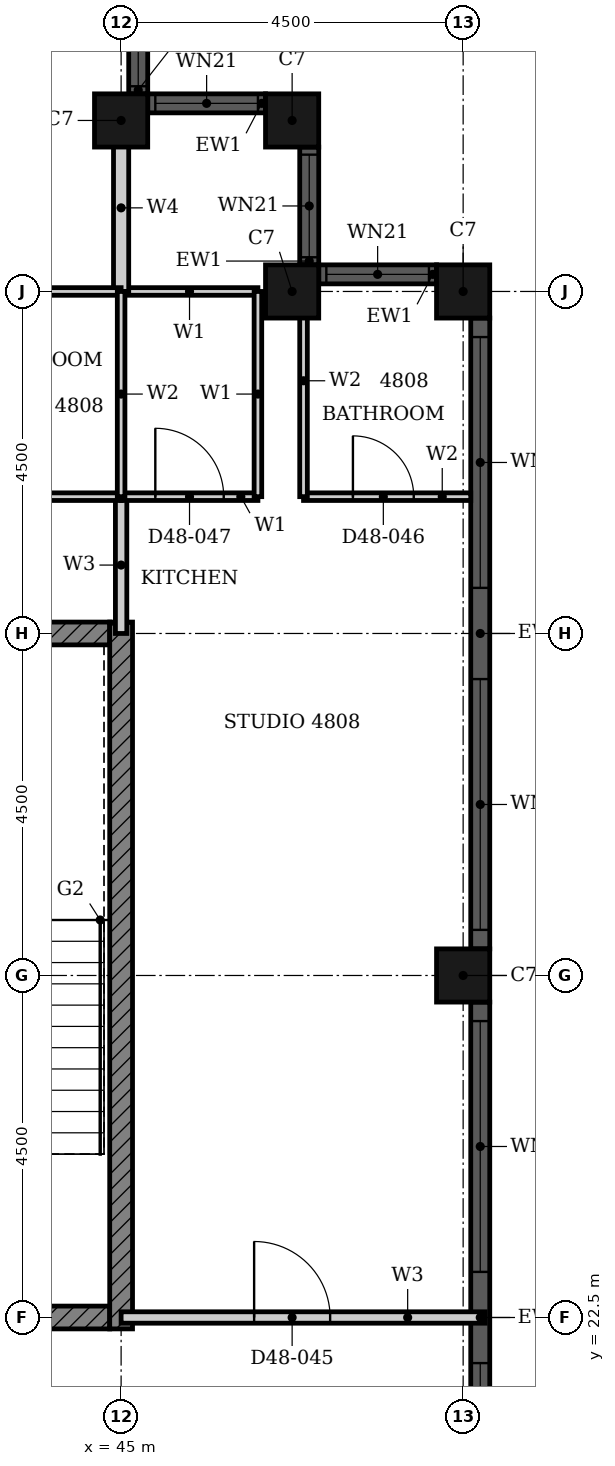
"""IFC4 building model, lengths in metres.
Left out: names, types, materials, properties, quantities, classifications, styles, units other than length and angle.
Written with IfcOpenShell. Run it as: python <this file> out.ifc"""

import sys

from ifc_helpers import new_model, si_unit, direction, frame, frame_2d, origin, origin_2d, place, context, subcontext, project, spatial, rectangle, hollow_rectangle, extrude, element, fill, save


model = new_model("IFC4")
c1 = context("Model", 3, precision=1e-05, world=origin(), true_north=direction((0.0, 1.0)))
c2 = subcontext(c1, "Body", "Model", "MODEL_VIEW")
j1 = project(units=[si_unit("LENGTHUNIT", "METRE"), si_unit("PLANEANGLEUNIT", "RADIAN")], contexts=[c1])
p1 = place(None, origin())
s1 = spatial("IfcSite", under=j1, at=p1, CompositionType="ELEMENT")
p2 = place(p1, origin())
s2 = spatial("IfcBuilding", under=s1, at=p2, CompositionType="ELEMENT")
p3 = place(p2, frame((0.0, 0.0, 192.4)))
s3 = spatial("IfcBuildingStorey", under=s2, at=p3, CompositionType="ELEMENT", Elevation=192.4)
for number, where, z_axis, x_axis in (
    (1, (49.5, 27.0, 0.0), (0.0, 0.0, 1.0), (1.0, 0.0, 0.0)),
    (2, (49.5, 36.0, 0.0), (0.0, 0.0, 1.0), (1.0, 0.0, 0.0)),
    (3, (47.25, 36.0, 0.0), (0.0, 0.0, 1.0), (1.0, 0.0, 0.0)),
    (4, (47.25, 38.25, 0.0), (0.0, 0.0, 1.0), (1.0, 0.0, 0.0)),
    (5, (45.0, 38.25, 0.0), (0.0, 0.0, 1.0), (1.0, 0.0, 0.0)),
):
    element("IfcColumn", number, at=place(p3, frame(where, z_axis=z_axis, x_axis=x_axis)), inside=s3, PredefinedType="COLUMN", context=c2, shape_type="SweptSolid", body=[
        extrude(hollow_rectangle(XDim=0.7, YDim=0.7, WallThickness=0.022, at=origin_2d()), origin(), (0.0, 0.0, 1.0), 3.7),
    ])
p4 = place(p3, frame((49.725, 18.35, 0.0), z_axis=(0.0, 0.0, 1.0), x_axis=(0.0, 1.0, 0.0)))
e6 = element("IfcWall", 6, at=p4, inside=s3, PredefinedType="SOLIDWALL", context=c2, shape_type="SweptSolid", body=[
    extrude(rectangle(XDim=8.3, YDim=0.25, at=frame_2d((4.15, 0.0))), origin(), (0.0, 0.0, 1.0), 3.7),
])
p5 = place(p4, frame((0.25, 0.0, 0.45)))
e7 = element("IfcOpeningElement", 7, at=p5, cuts=e6, PredefinedType="OPENING", context=c2, shape_type="SweptSolid", body=[
    extrude(rectangle(XDim=3.3, YDim=2.3, at=frame_2d((1.65, 1.15))), frame((0.0, 0.135, 0.0), z_axis=(0.0, -1.0, 0.0), x_axis=(1.0, 0.0, 0.0)), (0.0, 0.0, 1.0), 0.27),
])
p6 = place(p4, frame((4.75, 0.0, 0.45)))
e8 = element("IfcOpeningElement", 8, at=p6, cuts=e6, PredefinedType="OPENING", context=c2, shape_type="SweptSolid", body=[
    extrude(rectangle(XDim=3.3, YDim=2.3, at=frame_2d((1.65, 1.15))), frame((0.0, 0.135, 0.0), z_axis=(0.0, -1.0, 0.0), x_axis=(1.0, 0.0, 0.0)), (0.0, 0.0, 1.0), 0.27),
])
p7 = place(p3, frame((49.725, 27.35, 0.0), z_axis=(0.0, 0.0, 1.0), x_axis=(0.0, 1.0, 0.0)))
e9 = element("IfcWall", 9, at=p7, inside=s3, PredefinedType="SOLIDWALL", context=c2, shape_type="SweptSolid", body=[
    extrude(rectangle(XDim=8.3, YDim=0.25, at=frame_2d((4.15, 0.0))), origin(), (0.0, 0.0, 1.0), 3.7),
])
p8 = place(p7, frame((0.25, 0.0, 0.45)))
e10 = element("IfcOpeningElement", 10, at=p8, cuts=e9, PredefinedType="OPENING", context=c2, shape_type="SweptSolid", body=[
    extrude(rectangle(XDim=3.3, YDim=2.3, at=frame_2d((1.65, 1.15))), frame((0.0, 0.135, 0.0), z_axis=(0.0, -1.0, 0.0), x_axis=(1.0, 0.0, 0.0)), (0.0, 0.0, 1.0), 0.27),
])
p9 = place(p7, frame((4.75, 0.0, 0.45)))
e11 = element("IfcOpeningElement", 11, at=p9, cuts=e9, PredefinedType="OPENING", context=c2, shape_type="SweptSolid", body=[
    extrude(rectangle(XDim=3.3, YDim=2.3, at=frame_2d((1.65, 1.15))), frame((0.0, 0.135, 0.0), z_axis=(0.0, -1.0, 0.0), x_axis=(1.0, 0.0, 0.0)), (0.0, 0.0, 1.0), 0.27),
])
p10 = place(p3, frame((49.15, 36.225, 0.0), z_axis=(0.0, 0.0, 1.0), x_axis=(-1.0, 0.0, 0.0)))
e12 = element("IfcWall", 12, at=p10, inside=s3, PredefinedType="SOLIDWALL", context=c2, shape_type="SweptSolid", body=[
    extrude(rectangle(XDim=1.55, YDim=0.25, at=frame_2d((0.775, 0.0))), origin(), (0.0, 0.0, 1.0), 3.7),
])
p11 = place(p10, frame((0.1, 0.0, 0.9)))
e13 = element("IfcOpeningElement", 13, at=p11, cuts=e12, PredefinedType="OPENING", context=c2, shape_type="SweptSolid", body=[
    extrude(rectangle(XDim=1.35, YDim=1.85, at=frame_2d((0.675, 0.925))), frame((0.0, 0.135, 0.0), z_axis=(0.0, -1.0, 0.0), x_axis=(1.0, 0.0, 0.0)), (0.0, 0.0, 1.0), 0.27),
])
p12 = place(p3, frame((47.475, 36.35, 0.0), z_axis=(0.0, 0.0, 1.0), x_axis=(0.0, 1.0, 0.0)))
e14 = element("IfcWall", 14, at=p12, inside=s3, PredefinedType="SOLIDWALL", context=c2, shape_type="SweptSolid", body=[
    extrude(rectangle(XDim=1.55, YDim=0.25, at=frame_2d((0.775, 0.0))), origin(), (0.0, 0.0, 1.0), 3.7),
])
p13 = place(p12, frame((0.1, 0.0, 0.9)))
e15 = element("IfcOpeningElement", 15, at=p13, cuts=e14, PredefinedType="OPENING", context=c2, shape_type="SweptSolid", body=[
    extrude(rectangle(XDim=1.35, YDim=1.85, at=frame_2d((0.675, 0.925))), frame((0.0, 0.135, 0.0), z_axis=(0.0, -1.0, 0.0), x_axis=(1.0, 0.0, 0.0)), (0.0, 0.0, 1.0), 0.27),
])
p14 = place(p3, frame((46.9, 38.475, 0.0), z_axis=(0.0, 0.0, 1.0), x_axis=(-1.0, 0.0, 0.0)))
e16 = element("IfcWall", 16, at=p14, inside=s3, PredefinedType="SOLIDWALL", context=c2, shape_type="SweptSolid", body=[
    extrude(rectangle(XDim=1.55, YDim=0.25, at=frame_2d((0.775, 0.0))), origin(), (0.0, 0.0, 1.0), 3.7),
])
p15 = place(p14, frame((0.1, 0.0, 0.9)))
e17 = element("IfcOpeningElement", 17, at=p15, cuts=e16, PredefinedType="OPENING", context=c2, shape_type="SweptSolid", body=[
    extrude(rectangle(XDim=1.35, YDim=1.85, at=frame_2d((0.675, 0.925))), frame((0.0, 0.135, 0.0), z_axis=(0.0, -1.0, 0.0), x_axis=(1.0, 0.0, 0.0)), (0.0, 0.0, 1.0), 0.27),
])
p16 = place(p3, frame((45.225, 38.6, 0.0), z_axis=(0.0, 0.0, 1.0), x_axis=(0.0, 1.0, 0.0)))
e18 = element("IfcWall", 18, at=p16, inside=s3, PredefinedType="SOLIDWALL", context=c2, shape_type="SweptSolid", body=[
    extrude(rectangle(XDim=1.55, YDim=0.25, at=frame_2d((0.775, 0.0))), origin(), (0.0, 0.0, 1.0), 3.7),
])
p17 = place(p16, frame((0.1, 0.0, 0.9)))
e19 = element("IfcOpeningElement", 19, at=p17, cuts=e18, PredefinedType="OPENING", context=c2, shape_type="SweptSolid", body=[
    extrude(rectangle(XDim=1.35, YDim=1.85, at=frame_2d((0.675, 0.925))), frame((0.0, 0.135, 0.0), z_axis=(0.0, -1.0, 0.0), x_axis=(1.0, 0.0, 0.0)), (0.0, 0.0, 1.0), 0.27),
])
p18 = place(p3, frame((32.911, 22.5, 0.0), z_axis=(0.0, 0.0, 1.0), x_axis=(1.0, 0.0, 0.0)))
e20 = element("IfcWall", 20, at=p18, inside=s3, PredefinedType="SHEAR", context=c2, shape_type="SweptSolid", body=[
    extrude(rectangle(XDim=11.939, YDim=0.3, at=frame_2d((5.97, 0.0))), origin(), (0.0, 0.0, 1.0), 3.4),
])
p19 = place(p18, frame((5.404, 0.0, 0.0)))
e21 = element("IfcOpeningElement", 21, at=p19, cuts=e20, PredefinedType="OPENING", context=c2, shape_type="SweptSolid", body=[
    extrude(rectangle(XDim=1.8, YDim=2.1, at=frame_2d((0.9, 1.05))), frame((0.0, 0.16, 0.0), z_axis=(0.0, -1.0, 0.0), x_axis=(1.0, 0.0, 0.0)), (0.0, 0.0, 1.0), 0.32),
])
p20 = place(p3, frame((40.625, 31.5, 0.0), z_axis=(0.0, 0.0, 1.0), x_axis=(1.0, 0.0, 0.0)))
e22 = element("IfcWall", 22, at=p20, inside=s3, PredefinedType="SHEAR", context=c2, shape_type="SweptSolid", body=[
    extrude(rectangle(XDim=4.225, YDim=0.3, at=frame_2d((2.113, 0.0))), origin(), (0.0, 0.0, 1.0), 3.4),
])
p21 = place(p3, frame((45.0, 22.35, 0.0), z_axis=(0.0, 0.0, 1.0), x_axis=(0.0, 1.0, 0.0)))
e23 = element("IfcWall", 23, at=p21, inside=s3, PredefinedType="SHEAR", context=c2, shape_type="SweptSolid", body=[
    extrude(rectangle(XDim=9.3, YDim=0.3, at=frame_2d((4.65, 0.0))), origin(), (0.0, 0.0, 1.0), 3.4),
])
p22 = place(p3, frame((45.0, 22.5, 0.0), z_axis=(0.0, 0.0, 1.0), x_axis=(1.0, 0.0, 0.0)))
e24 = element("IfcWall", 24, at=p22, inside=s3, PredefinedType="PARTITIONING", context=c2, shape_type="SweptSolid", body=[
    extrude(rectangle(XDim=4.79, YDim=0.15, at=frame_2d((2.395, 0.0))), origin(), (0.0, 0.0, 1.0), 3.4),
])
p23 = place(p22, frame((1.75, 0.0, 0.0)))
e25 = element("IfcOpeningElement", 25, at=p23, cuts=e24, PredefinedType="OPENING", context=c2, shape_type="SweptSolid", body=[
    extrude(rectangle(XDim=1.0, YDim=2.2, at=frame_2d((0.5, 1.1))), frame((0.0, 0.085, 0.0), z_axis=(0.0, -1.0, 0.0), x_axis=(1.0, 0.0, 0.0)), (0.0, 0.0, 1.0), 0.17),
])
p24 = place(p3, frame((45.0, 31.5, 0.0), z_axis=(0.0, 0.0, 1.0), x_axis=(0.0, 1.0, 0.0)))
e26 = element("IfcWall", 26, at=p24, inside=s3, PredefinedType="PARTITIONING", context=c2, shape_type="SweptSolid", body=[
    extrude(rectangle(XDim=1.8, YDim=0.15, at=frame_2d((0.9, 0.0))), origin(), (0.0, 0.0, 1.0), 3.4),
])
p25 = place(p3, frame((45.0, 33.3, 0.0), z_axis=(0.0, 0.0, 1.0), x_axis=(1.0, 0.0, 0.0)))
e27 = element("IfcWall", 27, at=p25, inside=s3, PredefinedType="PARTITIONING", context=c2, shape_type="SweptSolid", body=[
    extrude(rectangle(XDim=1.8, YDim=0.1, at=frame_2d((0.9, 0.0))), origin(), (0.0, 0.0, 1.0), 3.4),
])
p26 = place(p25, frame((0.45, 0.0, 0.0)))
e28 = element("IfcOpeningElement", 28, at=p26, cuts=e27, PredefinedType="OPENING", context=c2, shape_type="SweptSolid", body=[
    extrude(rectangle(XDim=0.9, YDim=2.1, at=frame_2d((0.45, 1.05))), frame((0.0, 0.06, 0.0), z_axis=(0.0, -1.0, 0.0), x_axis=(1.0, 0.0, 0.0)), (0.0, 0.0, 1.0), 0.12),
])
p27 = place(p3, frame((45.0, 36.0, 0.0), z_axis=(0.0, 0.0, 1.0), x_axis=(1.0, 0.0, 0.0)))
e29 = element("IfcWall", 29, at=p27, inside=s3, PredefinedType="PARTITIONING", context=c2, shape_type="SweptSolid", body=[
    extrude(rectangle(XDim=1.8, YDim=0.1, at=frame_2d((0.9, 0.0))), origin(), (0.0, 0.0, 1.0), 3.4),
])
p28 = place(p3, frame((46.8, 33.3, 0.0), z_axis=(0.0, 0.0, 1.0), x_axis=(0.0, 1.0, 0.0)))
e30 = element("IfcWall", 30, at=p28, inside=s3, PredefinedType="PARTITIONING", context=c2, shape_type="SweptSolid", body=[
    extrude(rectangle(XDim=2.7, YDim=0.1, at=frame_2d((1.35, 0.0))), origin(), (0.0, 0.0, 1.0), 3.4),
])
p29 = place(p3, frame((45.0, 36.0, 0.0), z_axis=(0.0, 0.0, 1.0), x_axis=(0.0, 1.0, 0.0)))
e31 = element("IfcWall", 31, at=p29, inside=s3, PredefinedType="PARTITIONING", context=c2, shape_type="SweptSolid", body=[
    extrude(rectangle(XDim=2.2, YDim=0.2, at=frame_2d((1.1, 0.0))), origin(), (0.0, 0.0, 1.0), 3.4),
])
p30 = place(p3, frame((42.6, 33.3, 0.0), z_axis=(0.0, 0.0, 1.0), x_axis=(1.0, 0.0, 0.0)))
e32 = element("IfcWall", 32, at=p30, inside=s3, PredefinedType="PARTITIONING", context=c2, shape_type="SweptSolid", body=[
    extrude(rectangle(XDim=2.4, YDim=0.1, at=frame_2d((1.2, 0.0))), origin(), (0.0, 0.0, 1.0), 3.4),
])
p31 = place(p3, frame((47.4, 33.3, 0.0), z_axis=(0.0, 0.0, 1.0), x_axis=(1.0, 0.0, 0.0)))
e33 = element("IfcWall", 33, at=p31, inside=s3, PredefinedType="PARTITIONING", context=c2, shape_type="SweptSolid", body=[
    extrude(rectangle(XDim=2.2, YDim=0.1, at=frame_2d((1.1, 0.0))), origin(), (0.0, 0.0, 1.0), 3.4),
])
p32 = place(p31, frame((0.65, 0.0, 0.0)))
e34 = element("IfcOpeningElement", 34, at=p32, cuts=e33, PredefinedType="OPENING", context=c2, shape_type="SweptSolid", body=[
    extrude(rectangle(XDim=0.8, YDim=2.1, at=frame_2d((0.4, 1.05))), frame((0.0, 0.06, 0.0), z_axis=(0.0, -1.0, 0.0), x_axis=(1.0, 0.0, 0.0)), (0.0, 0.0, 1.0), 0.12),
])
p33 = place(p3, frame((42.6, 36.0, 0.0), z_axis=(0.0, 0.0, 1.0), x_axis=(1.0, 0.0, 0.0)))
e35 = element("IfcWall", 35, at=p33, inside=s3, PredefinedType="PARTITIONING", context=c2, shape_type="SweptSolid", body=[
    extrude(rectangle(XDim=2.4, YDim=0.1, at=frame_2d((1.2, 0.0))), origin(), (0.0, 0.0, 1.0), 3.4),
])
p34 = place(p3, frame((45.0, 33.3, 0.0), z_axis=(0.0, 0.0, 1.0), x_axis=(0.0, 1.0, 0.0)))
e36 = element("IfcWall", 36, at=p34, inside=s3, PredefinedType="PARTITIONING", context=c2, shape_type="SweptSolid", body=[
    extrude(rectangle(XDim=2.7, YDim=0.1, at=frame_2d((1.35, 0.0))), origin(), (0.0, 0.0, 1.0), 3.4),
])
p35 = place(p3, frame((47.4, 33.3, 0.0), z_axis=(0.0, 0.0, 1.0), x_axis=(0.0, 1.0, 0.0)))
e37 = element("IfcWall", 37, at=p35, inside=s3, PredefinedType="PARTITIONING", context=c2, shape_type="SweptSolid", body=[
    extrude(rectangle(XDim=3.05, YDim=0.1, at=frame_2d((1.525, 0.0))), origin(), (0.0, 0.0, 1.0), 3.4),
])
p36 = place(p5, origin())
e38 = element("IfcWindow", 38, at=p36, inside=s3, PartitioningType="SINGLE_PANEL", PredefinedType="WINDOW", context=c2, shape_type="SweptSolid", body=[
    extrude(rectangle(XDim=3.3, YDim=2.3, at=frame_2d((1.65, 1.15))), frame((0.0, 0.03, 0.0), z_axis=(0.0, -1.0, 0.0), x_axis=(1.0, 0.0, 0.0)), (0.0, 0.0, 1.0), 0.06),
])
fill(e7, e38)
p37 = place(p6, origin())
e39 = element("IfcWindow", 39, at=p37, inside=s3, PartitioningType="SINGLE_PANEL", PredefinedType="WINDOW", context=c2, shape_type="SweptSolid", body=[
    extrude(rectangle(XDim=3.3, YDim=2.3, at=frame_2d((1.65, 1.15))), frame((0.0, 0.03, 0.0), z_axis=(0.0, -1.0, 0.0), x_axis=(1.0, 0.0, 0.0)), (0.0, 0.0, 1.0), 0.06),
])
fill(e8, e39)
p38 = place(p8, origin())
e40 = element("IfcWindow", 40, at=p38, inside=s3, PartitioningType="SINGLE_PANEL", PredefinedType="WINDOW", context=c2, shape_type="SweptSolid", body=[
    extrude(rectangle(XDim=3.3, YDim=2.3, at=frame_2d((1.65, 1.15))), frame((0.0, 0.03, 0.0), z_axis=(0.0, -1.0, 0.0), x_axis=(1.0, 0.0, 0.0)), (0.0, 0.0, 1.0), 0.06),
])
fill(e10, e40)
p39 = place(p9, origin())
e41 = element("IfcWindow", 41, at=p39, inside=s3, PartitioningType="SINGLE_PANEL", PredefinedType="WINDOW", context=c2, shape_type="SweptSolid", body=[
    extrude(rectangle(XDim=3.3, YDim=2.3, at=frame_2d((1.65, 1.15))), frame((0.0, 0.03, 0.0), z_axis=(0.0, -1.0, 0.0), x_axis=(1.0, 0.0, 0.0)), (0.0, 0.0, 1.0), 0.06),
])
fill(e11, e41)
p40 = place(p11, origin())
e42 = element("IfcWindow", 42, at=p40, inside=s3, PartitioningType="SINGLE_PANEL", PredefinedType="WINDOW", context=c2, shape_type="SweptSolid", body=[
    extrude(rectangle(XDim=1.35, YDim=1.85, at=frame_2d((0.675, 0.925))), frame((0.0, 0.03, 0.0), z_axis=(0.0, -1.0, 0.0), x_axis=(1.0, 0.0, 0.0)), (0.0, 0.0, 1.0), 0.06),
])
fill(e13, e42)
p41 = place(p13, origin())
e43 = element("IfcWindow", 43, at=p41, inside=s3, PartitioningType="SINGLE_PANEL", PredefinedType="WINDOW", context=c2, shape_type="SweptSolid", body=[
    extrude(rectangle(XDim=1.35, YDim=1.85, at=frame_2d((0.675, 0.925))), frame((0.0, 0.03, 0.0), z_axis=(0.0, -1.0, 0.0), x_axis=(1.0, 0.0, 0.0)), (0.0, 0.0, 1.0), 0.06),
])
fill(e15, e43)
p42 = place(p15, origin())
e44 = element("IfcWindow", 44, at=p42, inside=s3, PartitioningType="SINGLE_PANEL", PredefinedType="WINDOW", context=c2, shape_type="SweptSolid", body=[
    extrude(rectangle(XDim=1.35, YDim=1.85, at=frame_2d((0.675, 0.925))), frame((0.0, 0.03, 0.0), z_axis=(0.0, -1.0, 0.0), x_axis=(1.0, 0.0, 0.0)), (0.0, 0.0, 1.0), 0.06),
])
fill(e17, e44)
p43 = place(p17, origin())
e45 = element("IfcWindow", 45, at=p43, inside=s3, PartitioningType="SINGLE_PANEL", PredefinedType="WINDOW", context=c2, shape_type="SweptSolid", body=[
    extrude(rectangle(XDim=1.35, YDim=1.85, at=frame_2d((0.675, 0.925))), frame((0.0, 0.03, 0.0), z_axis=(0.0, -1.0, 0.0), x_axis=(1.0, 0.0, 0.0)), (0.0, 0.0, 1.0), 0.06),
])
fill(e19, e45)
p44 = place(p23, origin())
e46 = element("IfcDoor", 46, at=p44, inside=s3, OperationType="SINGLE_SWING_RIGHT", PredefinedType="DOOR", context=c2, shape_type="SweptSolid", body=[
    extrude(rectangle(XDim=1.0, YDim=2.2, at=frame_2d((0.5, 1.1))), frame((0.0, 0.025, 0.0), z_axis=(0.0, -1.0, 0.0), x_axis=(1.0, 0.0, 0.0)), (0.0, 0.0, 1.0), 0.05),
])
fill(e25, e46)
p45 = place(p32, origin())
e47 = element("IfcDoor", 47, at=p45, inside=s3, OperationType="SINGLE_SWING_RIGHT", PredefinedType="DOOR", context=c2, shape_type="SweptSolid", body=[
    extrude(rectangle(XDim=0.8, YDim=2.1, at=frame_2d((0.4, 1.05))), frame((0.0, 0.025, 0.0), z_axis=(0.0, -1.0, 0.0), x_axis=(1.0, 0.0, 0.0)), (0.0, 0.0, 1.0), 0.05),
])
fill(e34, e47)
p46 = place(p26, origin())
e48 = element("IfcDoor", 48, at=p46, inside=s3, OperationType="SINGLE_SWING_LEFT", PredefinedType="DOOR", context=c2, shape_type="SweptSolid", body=[
    extrude(rectangle(XDim=0.9, YDim=2.1, at=frame_2d((0.45, 1.05))), frame((0.0, 0.025, 0.0), z_axis=(0.0, -1.0, 0.0), x_axis=(1.0, 0.0, 0.0)), (0.0, 0.0, 1.0), 0.05),
])
fill(e28, e48)
save(model, sys.argv[1])
